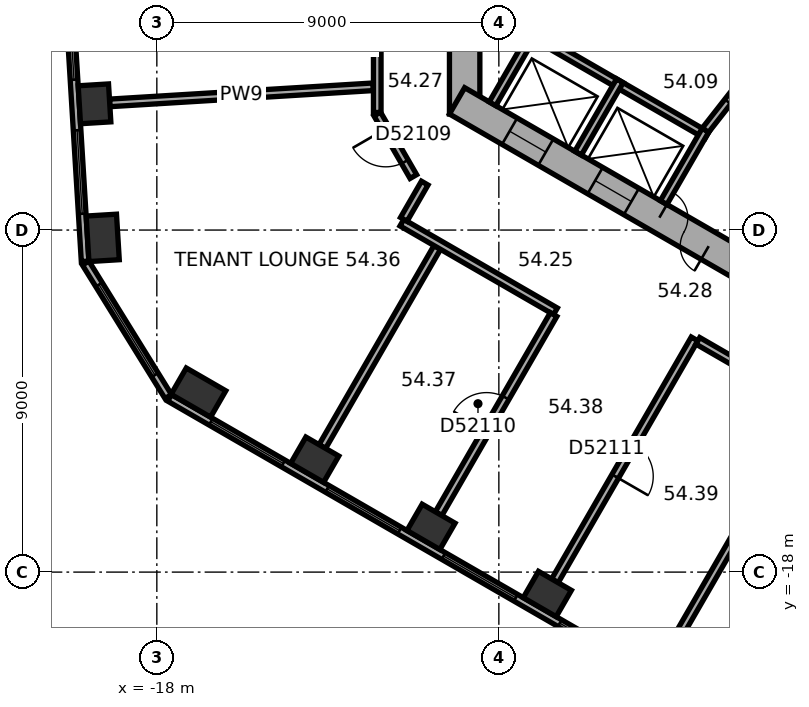
"""IFC4 building model, lengths in metres.
Left out: names, types, materials, properties, quantities, classifications, styles, units other than length and angle.
Written with IfcOpenShell. Run it as: python <this file> out.ifc"""

import sys

from ifc_helpers import new_model, si_unit, direction, frame, frame_2d, origin, origin_2d, place, context, subcontext, project, spatial, rectangle, extrude, element, fill, save


model = new_model("IFC4")
c1 = context("Model", 3, precision=1e-05, world=origin(), true_north=direction((0.0, 1.0)))
c2 = subcontext(c1, "Body", "Model", "MODEL_VIEW")
j1 = project(units=[si_unit("LENGTHUNIT", "METRE"), si_unit("PLANEANGLEUNIT", "RADIAN")], contexts=[c1])
p1 = place(None, origin())
s1 = spatial("IfcSite", under=j1, at=p1, CompositionType="ELEMENT")
p2 = place(p1, origin())
s2 = spatial("IfcBuilding", under=s1, at=p2, CompositionType="ELEMENT")
p3 = place(p2, frame((0.0, 0.0, 221.7)))
s3 = spatial("IfcBuildingStorey", under=s2, at=p3, CompositionType="ELEMENT", Elevation=221.7)
p4 = place(p3, frame((-19.64, -5.679, 0.0), z_axis=(0.0, 0.0, 1.0), x_axis=(0.061048539535, -0.998134798422, 0.0)))
e1 = element("IfcColumn", 1, at=p4, inside=s3, PredefinedType="COLUMN", context=c2, shape_type="SweptSolid", body=[
    extrude(rectangle(XDim=1.0, YDim=0.8, at=origin_2d()), origin(), (0.0, 0.0, 1.0), 3.7),
])
for number, where, z_axis, x_axis in (
    (2, (-19.424, -9.206, 0.0), (0.0, 0.0, 1.0), (0.061, -0.998, 0.0)),
    (3, (-16.906, -13.276, 0.0), (0.0, 0.0, 1.0), (0.866, -0.5, 0.0)),
):
    element("IfcColumn", number, at=place(p3, frame(where, z_axis=z_axis, x_axis=x_axis)), inside=s3, PredefinedType="COLUMN", context=c2, shape_type="SweptSolid", body=[
        extrude(rectangle(XDim=1.2, YDim=0.8, at=origin_2d()), origin(), (0.0, 0.0, 1.0), 3.7),
    ])
for number, where, z_axis, x_axis in (
    (4, (-13.845, -15.042, 0.0), (0.0, 0.0, 1.0), (0.866, -0.5, 0.0)),
    (5, (-10.785, -16.809, 0.0), (0.0, 0.0, 1.0), (0.866, -0.5, 0.0)),
    (6, (-7.725, -18.576, 0.0), (0.0, 0.0, 1.0), (0.866, -0.5, 0.0)),
):
    element("IfcColumn", number, at=place(p3, frame(where, z_axis=z_axis, x_axis=x_axis)), inside=s3, PredefinedType="COLUMN", context=c2, shape_type="SweptSolid", body=[
        extrude(rectangle(XDim=1.0, YDim=0.8, at=origin_2d()), origin(), (0.0, 0.0, 1.0), 3.7),
    ])
p5 = place(p3, frame((-9.9, 5.947, 0.0), z_axis=(0.0, 0.0, 1.0), x_axis=(0.0, -1.0, 0.0)))
e7 = element("IfcWall", 7, at=p5, inside=s3, PredefinedType="SHEAR", context=c2, shape_type="SweptSolid", body=[
    extrude(rectangle(XDim=11.894, YDim=0.8, at=frame_2d((5.947, 0.0))), origin(), (0.0, 0.0, 1.0), 3.7),
])
p6 = place(p5, frame((5.097, 0.0, 0.0)))
e8 = element("IfcOpeningElement", 8, at=p6, cuts=e7, PredefinedType="OPENING", context=c2, shape_type="SweptSolid", body=[
    extrude(rectangle(XDim=1.1, YDim=2.1, at=frame_2d((0.55, 1.05))), frame((0.0, 0.41, 0.0), z_axis=(0.0, -1.0, 0.0), x_axis=(1.0, 0.0, 0.0)), (0.0, 0.0, 1.0), 0.82),
])
p7 = place(p5, frame((7.697, 0.0, 0.0)))
e9 = element("IfcOpeningElement", 9, at=p7, cuts=e7, PredefinedType="OPENING", context=c2, shape_type="SweptSolid", body=[
    extrude(rectangle(XDim=1.1, YDim=2.1, at=frame_2d((0.55, 1.05))), frame((0.0, 0.41, 0.0), z_axis=(0.0, -1.0, 0.0), x_axis=(1.0, 0.0, 0.0)), (0.0, 0.0, 1.0), 0.82),
])
p8 = place(p3, frame((-10.1, -5.6, 0.0), z_axis=(0.0, 0.0, 1.0), x_axis=(0.866023897231, -0.500002609418, 0.0)))
e10 = element("IfcWall", 10, at=p8, inside=s3, PredefinedType="SHEAR", context=c2, shape_type="SweptSolid", body=[
    extrude(rectangle(XDim=11.894, YDim=0.8, at=frame_2d((5.947, 0.0))), origin(), (0.0, 0.0, 1.0), 3.7),
])
p9 = place(p8, frame((6.147, 0.0, 0.0)))
e11 = element("IfcOpeningElement", 11, at=p9, cuts=e10, PredefinedType="OPENING", context=c2, shape_type="SweptSolid", body=[
    extrude(rectangle(XDim=1.5, YDim=2.1, at=frame_2d((0.75, 1.05))), frame((0.0, 0.41, 0.0), z_axis=(0.0, -1.0, 0.0), x_axis=(1.0, 0.0, 0.0)), (0.0, 0.0, 1.0), 0.82),
])
p10 = place(p8, frame((1.597, 0.0, 0.0)))
e12 = element("IfcOpeningElement", 12, at=p10, cuts=e10, PredefinedType="OPENING", context=c2, shape_type="SweptSolid", body=[
    extrude(rectangle(XDim=1.1, YDim=2.1, at=frame_2d((0.55, 1.05))), frame((0.0, 0.41, 0.0), z_axis=(0.0, -1.0, 0.0), x_axis=(1.0, 0.0, 0.0)), (0.0, 0.0, 1.0), 0.82),
])
p11 = place(p8, frame((4.197, 0.0, 0.0)))
e13 = element("IfcOpeningElement", 13, at=p11, cuts=e10, PredefinedType="OPENING", context=c2, shape_type="SweptSolid", body=[
    extrude(rectangle(XDim=1.1, YDim=2.1, at=frame_2d((0.55, 1.05))), frame((0.0, 0.41, 0.0), z_axis=(0.0, -1.0, 0.0), x_axis=(1.0, 0.0, 0.0)), (0.0, 0.0, 1.0), 0.82),
])
p12 = place(p3, frame((-21.038, 8.984, 0.0), z_axis=(0.0, 0.0, 1.0), x_axis=(0.061043935634, -0.998135079998, 0.0)))
e14 = element("IfcWall", 14, at=p12, inside=s3, PredefinedType="STANDARD", context=c2, shape_type="SweptSolid", body=[
    extrude(rectangle(XDim=18.841, YDim=0.2, at=frame_2d((9.421, 0.0))), origin(), (0.0, 0.0, 1.0), 3.7),
])
p13 = place(p12, frame((1.253, 0.0, 0.9)))
e15 = element("IfcOpeningElement", 15, at=p13, cuts=e14, PredefinedType="OPENING", context=c2, shape_type="SweptSolid", body=[
    extrude(rectangle(XDim=2.2, YDim=2.0, at=frame_2d((1.1, 1.0))), frame((0.0, 0.11, 0.0), z_axis=(0.0, -1.0, 0.0), x_axis=(1.0, 0.0, 0.0)), (0.0, 0.0, 1.0), 0.22),
])
p14 = place(p12, frame((4.786, 0.0, 0.9)))
e16 = element("IfcOpeningElement", 16, at=p14, cuts=e14, PredefinedType="OPENING", context=c2, shape_type="SweptSolid", body=[
    extrude(rectangle(XDim=2.2, YDim=2.0, at=frame_2d((1.1, 1.0))), frame((0.0, 0.11, 0.0), z_axis=(0.0, -1.0, 0.0), x_axis=(1.0, 0.0, 0.0)), (0.0, 0.0, 1.0), 0.22),
])
p15 = place(p12, frame((8.32, 0.0, 0.9)))
e17 = element("IfcOpeningElement", 17, at=p15, cuts=e14, PredefinedType="OPENING", context=c2, shape_type="SweptSolid", body=[
    extrude(rectangle(XDim=2.2, YDim=2.0, at=frame_2d((1.1, 1.0))), frame((0.0, 0.11, 0.0), z_axis=(0.0, -1.0, 0.0), x_axis=(1.0, 0.0, 0.0)), (0.0, 0.0, 1.0), 0.22),
])
p16 = place(p12, frame((11.854, 0.0, 0.9)))
e18 = element("IfcOpeningElement", 18, at=p16, cuts=e14, PredefinedType="OPENING", context=c2, shape_type="SweptSolid", body=[
    extrude(rectangle(XDim=2.2, YDim=2.0, at=frame_2d((1.1, 1.0))), frame((0.0, 0.11, 0.0), z_axis=(0.0, -1.0, 0.0), x_axis=(1.0, 0.0, 0.0)), (0.0, 0.0, 1.0), 0.22),
])
p17 = place(p12, frame((15.387, 0.0, 0.9)))
e19 = element("IfcOpeningElement", 19, at=p17, cuts=e14, PredefinedType="OPENING", context=c2, shape_type="SweptSolid", body=[
    extrude(rectangle(XDim=2.2, YDim=2.0, at=frame_2d((1.1, 1.0))), frame((0.0, 0.11, 0.0), z_axis=(0.0, -1.0, 0.0), x_axis=(1.0, 0.0, 0.0)), (0.0, 0.0, 1.0), 0.22),
])
p18 = place(p3, frame((-19.873, -9.869, 0.0), z_axis=(0.0, 0.0, 1.0), x_axis=(0.52626914263, -0.850318051975, 0.0)))
e20 = element("IfcWall", 20, at=p18, inside=s3, PredefinedType="STANDARD", context=c2, shape_type="SweptSolid", body=[
    extrude(rectangle(XDim=4.13, YDim=0.2, at=frame_2d((2.065, 0.0))), origin(), (0.0, 0.0, 1.0), 3.7),
])
p19 = place(p18, frame((0.665, 0.0, 0.9)))
e21 = element("IfcOpeningElement", 21, at=p19, cuts=e20, PredefinedType="OPENING", context=c2, shape_type="SweptSolid", body=[
    extrude(rectangle(XDim=2.8, YDim=2.0, at=frame_2d((1.4, 1.0))), frame((0.0, 0.11, 0.0), z_axis=(0.0, -1.0, 0.0), x_axis=(1.0, 0.0, 0.0)), (0.0, 0.0, 1.0), 0.22),
])
p20 = place(p3, frame((-17.664, -13.415, 0.0), z_axis=(0.0, 0.0, 1.0), x_axis=(0.866026555358, -0.49999800541, 0.0)))
e22 = element("IfcWall", 22, at=p20, inside=s3, PredefinedType="STANDARD", context=c2, shape_type="SweptSolid", body=[
    extrude(rectangle(XDim=18.841, YDim=0.2, at=frame_2d((9.421, 0.0))), origin(), (0.0, 0.0, 1.0), 3.7),
])
p21 = place(p20, frame((1.254, 0.0, 0.9)))
e23 = element("IfcOpeningElement", 23, at=p21, cuts=e22, PredefinedType="OPENING", context=c2, shape_type="SweptSolid", body=[
    extrude(rectangle(XDim=2.2, YDim=2.0, at=frame_2d((1.1, 1.0))), frame((0.0, 0.11, 0.0), z_axis=(0.0, -1.0, 0.0), x_axis=(1.0, 0.0, 0.0)), (0.0, 0.0, 1.0), 0.22),
])
p22 = place(p20, frame((4.788, 0.0, 0.9)))
e24 = element("IfcOpeningElement", 24, at=p22, cuts=e22, PredefinedType="OPENING", context=c2, shape_type="SweptSolid", body=[
    extrude(rectangle(XDim=2.2, YDim=2.0, at=frame_2d((1.1, 1.0))), frame((0.0, 0.11, 0.0), z_axis=(0.0, -1.0, 0.0), x_axis=(1.0, 0.0, 0.0)), (0.0, 0.0, 1.0), 0.22),
])
p23 = place(p20, frame((8.322, 0.0, 0.9)))
e25 = element("IfcOpeningElement", 25, at=p23, cuts=e22, PredefinedType="OPENING", context=c2, shape_type="SweptSolid", body=[
    extrude(rectangle(XDim=2.2, YDim=2.0, at=frame_2d((1.1, 1.0))), frame((0.0, 0.11, 0.0), z_axis=(0.0, -1.0, 0.0), x_axis=(1.0, 0.0, 0.0)), (0.0, 0.0, 1.0), 0.22),
])
p24 = place(p20, frame((11.855, 0.0, 0.9)))
e26 = element("IfcOpeningElement", 26, at=p24, cuts=e22, PredefinedType="OPENING", context=c2, shape_type="SweptSolid", body=[
    extrude(rectangle(XDim=2.2, YDim=2.0, at=frame_2d((1.1, 1.0))), frame((0.0, 0.11, 0.0), z_axis=(0.0, -1.0, 0.0), x_axis=(1.0, 0.0, 0.0)), (0.0, 0.0, 1.0), 0.22),
])
p25 = place(p20, frame((15.389, 0.0, 0.9)))
e27 = element("IfcOpeningElement", 27, at=p25, cuts=e22, PredefinedType="OPENING", context=c2, shape_type="SweptSolid", body=[
    extrude(rectangle(XDim=2.2, YDim=2.0, at=frame_2d((1.1, 1.0))), frame((0.0, 0.11, 0.0), z_axis=(0.0, -1.0, 0.0), x_axis=(1.0, 0.0, 0.0)), (0.0, 0.0, 1.0), 0.22),
])
p26 = place(p3, frame((-8.203, -3.809, 0.0), z_axis=(0.0, 0.0, 1.0), x_axis=(0.866028230842, -0.499995103361, 0.0)))
e28 = element("IfcWall", 28, at=p26, inside=s3, PredefinedType="PARTITIONING", context=c2, shape_type="SweptSolid", body=[
    extrude(rectangle(XDim=5.4, YDim=0.2, at=frame_2d((2.7, 0.0))), origin(), (0.0, 0.0, 1.0), 3.42),
])
for number, where, z_axis, x_axis in (
    (29, (-8.067, -3.772, 0.0), (0.0, 0.0, 1.0), (-0.5, -0.866, 0.0)),
    (30, (-5.815, -5.072, 0.0), (0.0, 0.0, 1.0), (-0.5, -0.866, 0.0)),
):
    element("IfcWall", number, at=place(p3, frame(where, z_axis=z_axis, x_axis=x_axis)), inside=s3, PredefinedType="PARTITIONING", context=c2, shape_type="SweptSolid", body=[
        extrude(rectangle(XDim=2.2, YDim=0.2, at=frame_2d((1.1, 0.0))), origin(), (0.0, 0.0, 1.0), 3.42),
    ])
p27 = place(p3, frame((-3.563, -6.372, 0.0), z_axis=(0.0, 0.0, 1.0), x_axis=(-0.499994660107, -0.866028486751, 0.0)))
e31 = element("IfcWall", 31, at=p27, inside=s3, PredefinedType="PARTITIONING", context=c2, shape_type="SweptSolid", body=[
    extrude(rectangle(XDim=2.2, YDim=0.2, at=frame_2d((1.1, 0.0))), origin(), (0.0, 0.0, 1.0), 3.42),
])
p28 = place(p3, frame((-1.712, -4.008, 0.0), z_axis=(0.0, 0.0, 1.0), x_axis=(-0.616549420702, -0.787316208287, 0.0)))
e32 = element("IfcWall", 32, at=p28, inside=s3, PredefinedType="PARTITIONING", context=c2, shape_type="SweptSolid", body=[
    extrude(rectangle(XDim=3.002, YDim=0.2, at=frame_2d((1.501, 0.0))), origin(), (0.0, 0.0, 1.0), 3.42),
])
p29 = place(p28, frame((1.15, 0.0, 0.0)))
e33 = element("IfcOpeningElement", 33, at=p29, cuts=e32, PredefinedType="OPENING", context=c2, shape_type="SweptSolid", body=[
    extrude(rectangle(XDim=0.9, YDim=2.1, at=frame_2d((0.45, 1.05))), frame((0.0, 0.11, 0.0), z_axis=(0.0, -1.0, 0.0), x_axis=(1.0, 0.0, 0.0)), (0.0, 0.0, 1.0), 0.22),
])
p30 = place(p3, frame((-19.241, -5.654, 0.0), z_axis=(0.0, 0.0, 1.0), x_axis=(0.998135538818, 0.061036432963, 0.0)))
e34 = element("IfcWall", 34, at=p30, inside=s3, PredefinedType="PARTITIONING", context=c2, shape_type="SweptSolid", body=[
    extrude(rectangle(XDim=6.944, YDim=0.2, at=frame_2d((3.472, 0.0))), origin(), (0.0, 0.0, 1.0), 2.87),
])
p31 = place(p3, frame((-13.646, -14.696, 0.0), z_axis=(0.0, 0.0, 1.0), x_axis=(0.500006596359, 0.866021595341, 0.0)))
e35 = element("IfcWall", 35, at=p31, inside=s3, PredefinedType="PARTITIONING", context=c2, shape_type="SweptSolid", body=[
    extrude(rectangle(XDim=6.049, YDim=0.2, at=frame_2d((3.025, 0.0))), origin(), (0.0, 0.0, 1.0), 3.42),
])
p32 = place(p3, frame((-12.2, -5.947, 0.0), z_axis=(0.0, 0.0, 1.0), x_axis=(0.500022797313, -0.86601224135, 0.0)))
e36 = element("IfcWall", 36, at=p32, inside=s3, PredefinedType="PARTITIONING", context=c2, shape_type="SweptSolid", body=[
    extrude(rectangle(XDim=1.9, YDim=0.2, at=frame_2d((0.95, 0.0))), origin(), (0.0, 0.0, 1.0), 3.42),
])
p33 = place(p32, frame((0.45, 0.0, 0.0)))
e37 = element("IfcOpeningElement", 37, at=p33, cuts=e36, PredefinedType="OPENING", context=c2, shape_type="SweptSolid", body=[
    extrude(rectangle(XDim=1.0, YDim=2.1, at=frame_2d((0.5, 1.05))), frame((0.0, 0.11, 0.0), z_axis=(0.0, -1.0, 0.0), x_axis=(1.0, 0.0, 0.0)), (0.0, 0.0, 1.0), 0.22),
])
p34 = place(p3, frame((-12.2, -4.201, 0.0), z_axis=(0.0, 0.0, 1.0), x_axis=(0.0, -1.0, 0.0)))
e38 = element("IfcWall", 38, at=p34, inside=s3, PredefinedType="PARTITIONING", context=c2, shape_type="SweptSolid", body=[
    extrude(rectangle(XDim=1.706, YDim=0.2, at=frame_2d((0.853, 0.0))), origin(), (0.0, 0.0, 1.0), 3.42),
])
p35 = place(p3, frame((-11.551, -8.805, 0.0), z_axis=(0.0, 0.0, 1.0), x_axis=(0.866038310922, -0.499977643516, 0.0)))
e39 = element("IfcWall", 39, at=p35, inside=s3, PredefinedType="PARTITIONING", context=c2, shape_type="SweptSolid", body=[
    extrude(rectangle(XDim=4.665, YDim=0.2, at=frame_2d((2.333, 0.0))), origin(), (0.0, 0.0, 1.0), 3.42),
])
p36 = place(p3, frame((-10.951, -7.765, 0.0), z_axis=(0.0, 0.0, 1.0), x_axis=(-0.499978356969, -0.866037899034, 0.0)))
e40 = element("IfcWall", 40, at=p36, inside=s3, PredefinedType="PARTITIONING", context=c2, shape_type="SweptSolid", body=[
    extrude(rectangle(XDim=1.101, YDim=0.2, at=frame_2d((0.551, 0.0))), origin(), (0.0, 0.0, 1.0), 3.42),
])
p37 = place(p3, frame((-10.585, -16.463, 0.0), z_axis=(0.0, 0.0, 1.0), x_axis=(0.499993802756, 0.866028981735, 0.0)))
e41 = element("IfcWall", 41, at=p37, inside=s3, PredefinedType="PARTITIONING", context=c2, shape_type="SweptSolid", body=[
    extrude(rectangle(XDim=6.049, YDim=0.2, at=frame_2d((3.024, 0.0))), origin(), (0.0, 0.0, 1.0), 2.87),
])
p38 = place(p37, frame((2.524, 0.0, 0.0)))
e42 = element("IfcOpeningElement", 42, at=p38, cuts=e41, PredefinedType="OPENING", context=c2, shape_type="SweptSolid", body=[
    extrude(rectangle(XDim=1.0, YDim=2.1, at=frame_2d((0.5, 1.05))), frame((0.0, 0.11, 0.0), z_axis=(0.0, -1.0, 0.0), x_axis=(1.0, 0.0, 0.0)), (0.0, 0.0, 1.0), 0.22),
])
p39 = place(p3, frame((-7.525, -18.23, 0.0), z_axis=(0.0, 0.0, 1.0), x_axis=(0.499983153418, 0.866035129944, 0.0)))
e43 = element("IfcWall", 43, at=p39, inside=s3, PredefinedType="PARTITIONING", context=c2, shape_type="SweptSolid", body=[
    extrude(rectangle(XDim=7.35, YDim=0.2, at=frame_2d((3.675, 0.0))), origin(), (0.0, 0.0, 1.0), 3.42),
])
p40 = place(p39, frame((3.175, 0.0, 0.0)))
e44 = element("IfcOpeningElement", 44, at=p40, cuts=e43, PredefinedType="OPENING", context=c2, shape_type="SweptSolid", body=[
    extrude(rectangle(XDim=1.0, YDim=2.1, at=frame_2d((0.5, 1.05))), frame((0.0, 0.11, 0.0), z_axis=(0.0, -1.0, 0.0), x_axis=(1.0, 0.0, 0.0)), (0.0, 0.0, 1.0), 0.22),
])
p41 = place(p3, frame((-4.465, -19.997, 0.0), z_axis=(0.0, 0.0, 1.0), x_axis=(0.500011802906, 0.866018589266, 0.0)))
e45 = element("IfcWall", 45, at=p41, inside=s3, PredefinedType="PARTITIONING", context=c2, shape_type="SweptSolid", body=[
    extrude(rectangle(XDim=7.377, YDim=0.2, at=frame_2d((3.688, 0.0))), origin(), (0.0, 0.0, 1.0), 3.42),
])
p42 = place(p3, frame((-3.763, -11.915, 0.0), z_axis=(0.0, 0.0, 1.0), x_axis=(0.866037915695, -0.499978328108, 0.0)))
e46 = element("IfcWall", 46, at=p42, inside=s3, PredefinedType="PARTITIONING", context=c2, shape_type="SweptSolid", body=[
    extrude(rectangle(XDim=3.249, YDim=0.2, at=frame_2d((1.625, 0.0))), origin(), (0.0, 0.0, 1.0), 3.42),
])
p43 = place(p16, origin())
e47 = element("IfcWindow", 47, at=p43, inside=s3, PartitioningType="SINGLE_PANEL", PredefinedType="WINDOW", context=c2, shape_type="SweptSolid", body=[
    extrude(rectangle(XDim=2.2, YDim=2.0, at=frame_2d((1.1, 1.0))), frame((0.0, 0.03, 0.0), z_axis=(0.0, -1.0, 0.0), x_axis=(1.0, 0.0, 0.0)), (0.0, 0.0, 1.0), 0.06),
])
fill(e18, e47)
p44 = place(p17, origin())
e48 = element("IfcWindow", 48, at=p44, inside=s3, PartitioningType="SINGLE_PANEL", PredefinedType="WINDOW", context=c2, shape_type="SweptSolid", body=[
    extrude(rectangle(XDim=2.2, YDim=2.0, at=frame_2d((1.1, 1.0))), frame((0.0, 0.03, 0.0), z_axis=(0.0, -1.0, 0.0), x_axis=(1.0, 0.0, 0.0)), (0.0, 0.0, 1.0), 0.06),
])
fill(e19, e48)
p45 = place(p19, origin())
e49 = element("IfcWindow", 49, at=p45, inside=s3, PartitioningType="SINGLE_PANEL", PredefinedType="WINDOW", context=c2, shape_type="SweptSolid", body=[
    extrude(rectangle(XDim=2.8, YDim=2.0, at=frame_2d((1.4, 1.0))), frame((0.0, 0.03, 0.0), z_axis=(0.0, -1.0, 0.0), x_axis=(1.0, 0.0, 0.0)), (0.0, 0.0, 1.0), 0.06),
])
fill(e21, e49)
p46 = place(p21, origin())
e50 = element("IfcWindow", 50, at=p46, inside=s3, PartitioningType="SINGLE_PANEL", PredefinedType="WINDOW", context=c2, shape_type="SweptSolid", body=[
    extrude(rectangle(XDim=2.2, YDim=2.0, at=frame_2d((1.1, 1.0))), frame((0.0, 0.03, 0.0), z_axis=(0.0, -1.0, 0.0), x_axis=(1.0, 0.0, 0.0)), (0.0, 0.0, 1.0), 0.06),
])
fill(e23, e50)
p47 = place(p22, origin())
e51 = element("IfcWindow", 51, at=p47, inside=s3, PartitioningType="SINGLE_PANEL", PredefinedType="WINDOW", context=c2, shape_type="SweptSolid", body=[
    extrude(rectangle(XDim=2.2, YDim=2.0, at=frame_2d((1.1, 1.0))), frame((0.0, 0.03, 0.0), z_axis=(0.0, -1.0, 0.0), x_axis=(1.0, 0.0, 0.0)), (0.0, 0.0, 1.0), 0.06),
])
fill(e24, e51)
p48 = place(p23, origin())
e52 = element("IfcWindow", 52, at=p48, inside=s3, PartitioningType="SINGLE_PANEL", PredefinedType="WINDOW", context=c2, shape_type="SweptSolid", body=[
    extrude(rectangle(XDim=2.2, YDim=2.0, at=frame_2d((1.1, 1.0))), frame((0.0, 0.03, 0.0), z_axis=(0.0, -1.0, 0.0), x_axis=(1.0, 0.0, 0.0)), (0.0, 0.0, 1.0), 0.06),
])
fill(e25, e52)
p49 = place(p24, origin())
e53 = element("IfcWindow", 53, at=p49, inside=s3, PartitioningType="SINGLE_PANEL", PredefinedType="WINDOW", context=c2, shape_type="SweptSolid", body=[
    extrude(rectangle(XDim=2.2, YDim=2.0, at=frame_2d((1.1, 1.0))), frame((0.0, 0.03, 0.0), z_axis=(0.0, -1.0, 0.0), x_axis=(1.0, 0.0, 0.0)), (0.0, 0.0, 1.0), 0.06),
])
fill(e26, e53)
p50 = place(p9, origin())
e54 = element("IfcDoor", 54, at=p50, inside=s3, OperationType="DOUBLE_DOOR_SINGLE_SWING", PredefinedType="DOOR", context=c2, shape_type="SweptSolid", body=[
    extrude(rectangle(XDim=1.5, YDim=2.1, at=frame_2d((0.75, 1.05))), frame((0.0, 0.025, 0.0), z_axis=(0.0, -1.0, 0.0), x_axis=(1.0, 0.0, 0.0)), (0.0, 0.0, 1.0), 0.05),
])
fill(e11, e54)
p51 = place(p29, origin())
e55 = element("IfcDoor", 55, at=p51, inside=s3, OperationType="SINGLE_SWING_LEFT", PredefinedType="DOOR", context=c2, shape_type="SweptSolid", body=[
    extrude(rectangle(XDim=0.9, YDim=2.1, at=frame_2d((0.45, 1.05))), frame((0.0, 0.025, 0.0), z_axis=(0.0, -1.0, 0.0), x_axis=(1.0, 0.0, 0.0)), (0.0, 0.0, 1.0), 0.05),
])
fill(e33, e55)
p52 = place(p10, origin())
e56 = element("IfcDoor", 56, at=p52, inside=s3, OperationType="DOUBLE_DOOR_SLIDING", PredefinedType="DOOR", context=c2, shape_type="SweptSolid", body=[
    extrude(rectangle(XDim=1.1, YDim=2.1, at=frame_2d((0.55, 1.05))), frame((0.0, 0.025, 0.0), z_axis=(0.0, -1.0, 0.0), x_axis=(1.0, 0.0, 0.0)), (0.0, 0.0, 1.0), 0.05),
])
fill(e12, e56)
p53 = place(p11, origin())
e57 = element("IfcDoor", 57, at=p53, inside=s3, OperationType="DOUBLE_DOOR_SLIDING", PredefinedType="DOOR", context=c2, shape_type="SweptSolid", body=[
    extrude(rectangle(XDim=1.1, YDim=2.1, at=frame_2d((0.55, 1.05))), frame((0.0, 0.025, 0.0), z_axis=(0.0, -1.0, 0.0), x_axis=(1.0, 0.0, 0.0)), (0.0, 0.0, 1.0), 0.05),
])
fill(e13, e57)
p54 = place(p33, origin())
e58 = element("IfcDoor", 58, at=p54, inside=s3, OperationType="SINGLE_SWING_LEFT", PredefinedType="DOOR", context=c2, shape_type="SweptSolid", body=[
    extrude(rectangle(XDim=1.0, YDim=2.1, at=frame_2d((0.5, 1.05))), frame((0.0, 0.025, 0.0), z_axis=(0.0, -1.0, 0.0), x_axis=(1.0, 0.0, 0.0)), (0.0, 0.0, 1.0), 0.05),
])
fill(e37, e58)
p55 = place(p38, origin())
e59 = element("IfcDoor", 59, at=p55, inside=s3, OperationType="SINGLE_SWING_LEFT", PredefinedType="DOOR", context=c2, shape_type="SweptSolid", body=[
    extrude(rectangle(XDim=1.0, YDim=2.1, at=frame_2d((0.5, 1.05))), frame((0.0, 0.025, 0.0), z_axis=(0.0, -1.0, 0.0), x_axis=(1.0, 0.0, 0.0)), (0.0, 0.0, 1.0), 0.05),
])
fill(e42, e59)
p56 = place(p40, origin())
e60 = element("IfcDoor", 60, at=p56, inside=s3, OperationType="SINGLE_SWING_LEFT", PredefinedType="DOOR", context=c2, shape_type="SweptSolid", body=[
    extrude(rectangle(XDim=1.0, YDim=2.1, at=frame_2d((0.5, 1.05))), frame((0.0, 0.025, 0.0), z_axis=(0.0, -1.0, 0.0), x_axis=(1.0, 0.0, 0.0)), (0.0, 0.0, 1.0), 0.05),
])
fill(e44, e60)
save(model, sys.argv[1])
